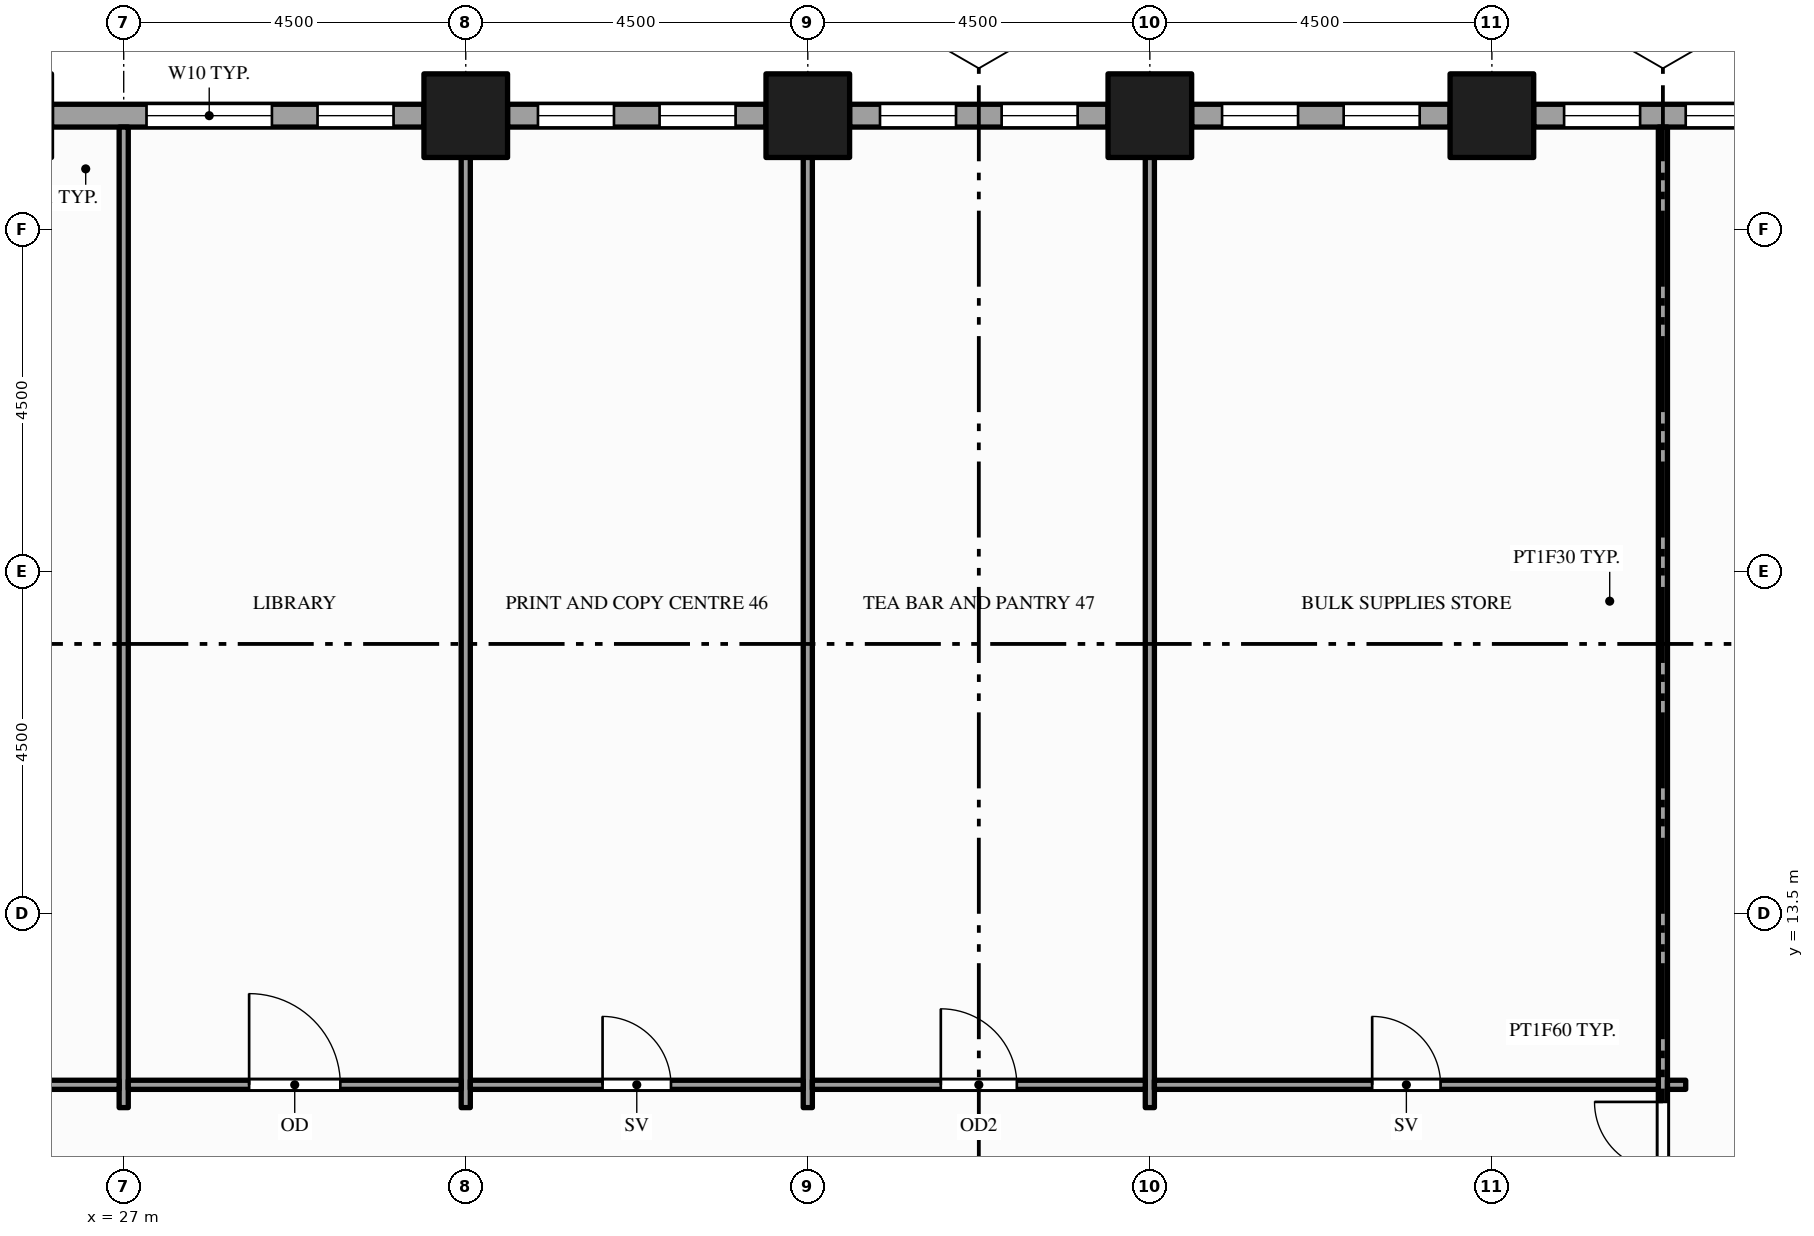
"""IFC4 building model, lengths in metres.
Left out: names, types, materials, properties, quantities, classifications, styles, units other than length and angle.
Written with IfcOpenShell. Run it as: python <this file> out.ifc"""

import sys

from ifc_helpers import new_model, si_unit, direction, frame, frame_2d, origin, origin_2d, place, context, subcontext, project, spatial, rectangle, hollow_rectangle, extrude, element, fill, save


model = new_model("IFC4")
c1 = context("Model", 3, precision=1e-05, world=origin(), true_north=direction((0.0, 1.0)))
c2 = subcontext(c1, "Body", "Model", "MODEL_VIEW")
j1 = project(units=[si_unit("LENGTHUNIT", "METRE"), si_unit("PLANEANGLEUNIT", "RADIAN")], contexts=[c1])
p1 = place(None, origin())
s1 = spatial("IfcSite", under=j1, at=p1, CompositionType="ELEMENT")
p2 = place(p1, origin())
s2 = spatial("IfcBuilding", under=s1, at=p2, CompositionType="ELEMENT")
p3 = place(p2, frame((0.0, 0.0, 73.0)))
s3 = spatial("IfcBuildingStorey", under=s2, at=p3, CompositionType="ELEMENT", Elevation=73.0)
for number, where, z_axis, x_axis in (
    (1, (31.5, 24.0, -0.15), (0.0, 0.0, 1.0), (1.0, 0.0, 0.0)),
    (2, (36.0, 24.0, -0.15), (0.0, 0.0, 1.0), (1.0, 0.0, 0.0)),
    (3, (40.5, 24.0, -0.15), (0.0, 0.0, 1.0), (1.0, 0.0, 0.0)),
    (4, (45.0, 24.0, -0.15), (0.0, 0.0, 1.0), (1.0, 0.0, 0.0)),
):
    element("IfcColumn", number, at=place(p3, frame(where, z_axis=z_axis, x_axis=x_axis)), inside=s3, PredefinedType="COLUMN", context=c2, shape_type="SweptSolid", body=[
        extrude(hollow_rectangle(XDim=1.1, YDim=1.1, WallThickness=0.06, at=origin_2d()), origin(), (0.0, 0.0, 1.0), 3.9),
    ])
p4 = place(p3, frame((48.95, 24.0, 0.0), z_axis=(0.0, 0.0, 1.0), x_axis=(-1.0, 0.0, 0.0)))
e5 = element("IfcWall", 5, at=p4, inside=s3, PredefinedType="STANDARD", context=c2, shape_type="SweptSolid", body=[
    extrude(rectangle(XDim=3.4, YDim=0.3, at=frame_2d((1.7, 0.0))), origin(), (0.0, 0.0, 1.0), 3.044),
])
p5 = place(p4, frame((0.4, 0.0, 0.9)))
e6 = element("IfcOpeningElement", 6, at=p5, cuts=e5, PredefinedType="OPENING", context=c2, shape_type="SweptSolid", body=[
    extrude(rectangle(XDim=1.0, YDim=2.0, at=frame_2d((0.5, 1.0))), frame((0.0, 0.16, 0.0), z_axis=(0.0, -1.0, 0.0), x_axis=(1.0, 0.0, 0.0)), (0.0, 0.0, 1.0), 0.32),
])
p6 = place(p4, frame((2.0, 0.0, 0.9)))
e7 = element("IfcOpeningElement", 7, at=p6, cuts=e5, PredefinedType="OPENING", context=c2, shape_type="SweptSolid", body=[
    extrude(rectangle(XDim=1.0, YDim=2.0, at=frame_2d((0.5, 1.0))), frame((0.0, 0.16, 0.0), z_axis=(0.0, -1.0, 0.0), x_axis=(1.0, 0.0, 0.0)), (0.0, 0.0, 1.0), 0.32),
])
p7 = place(p3, frame((44.45, 24.0, 0.0), z_axis=(0.0, 0.0, 1.0), x_axis=(-1.0, 0.0, 0.0)))
e8 = element("IfcWall", 8, at=p7, inside=s3, PredefinedType="STANDARD", context=c2, shape_type="SweptSolid", body=[
    extrude(rectangle(XDim=3.4, YDim=0.3, at=frame_2d((1.7, 0.0))), origin(), (0.0, 0.0, 1.0), 3.044),
])
p8 = place(p7, frame((0.4, 0.0, 0.9)))
e9 = element("IfcOpeningElement", 9, at=p8, cuts=e8, PredefinedType="OPENING", context=c2, shape_type="SweptSolid", body=[
    extrude(rectangle(XDim=1.0, YDim=2.0, at=frame_2d((0.5, 1.0))), frame((0.0, 0.16, 0.0), z_axis=(0.0, -1.0, 0.0), x_axis=(1.0, 0.0, 0.0)), (0.0, 0.0, 1.0), 0.32),
])
p9 = place(p7, frame((2.0, 0.0, 0.9)))
e10 = element("IfcOpeningElement", 10, at=p9, cuts=e8, PredefinedType="OPENING", context=c2, shape_type="SweptSolid", body=[
    extrude(rectangle(XDim=1.0, YDim=2.0, at=frame_2d((0.5, 1.0))), frame((0.0, 0.16, 0.0), z_axis=(0.0, -1.0, 0.0), x_axis=(1.0, 0.0, 0.0)), (0.0, 0.0, 1.0), 0.32),
])
p10 = place(p3, frame((39.95, 24.0, 0.0), z_axis=(0.0, 0.0, 1.0), x_axis=(-1.0, 0.0, 0.0)))
e11 = element("IfcWall", 11, at=p10, inside=s3, PredefinedType="STANDARD", context=c2, shape_type="SweptSolid", body=[
    extrude(rectangle(XDim=3.4, YDim=0.3, at=frame_2d((1.7, 0.0))), origin(), (0.0, 0.0, 1.0), 3.044),
])
p11 = place(p10, frame((0.4, 0.0, 0.9)))
e12 = element("IfcOpeningElement", 12, at=p11, cuts=e11, PredefinedType="OPENING", context=c2, shape_type="SweptSolid", body=[
    extrude(rectangle(XDim=1.0, YDim=2.0, at=frame_2d((0.5, 1.0))), frame((0.0, 0.16, 0.0), z_axis=(0.0, -1.0, 0.0), x_axis=(1.0, 0.0, 0.0)), (0.0, 0.0, 1.0), 0.32),
])
p12 = place(p10, frame((2.0, 0.0, 0.9)))
e13 = element("IfcOpeningElement", 13, at=p12, cuts=e11, PredefinedType="OPENING", context=c2, shape_type="SweptSolid", body=[
    extrude(rectangle(XDim=1.0, YDim=2.0, at=frame_2d((0.5, 1.0))), frame((0.0, 0.16, 0.0), z_axis=(0.0, -1.0, 0.0), x_axis=(1.0, 0.0, 0.0)), (0.0, 0.0, 1.0), 0.32),
])
p13 = place(p3, frame((35.45, 24.0, 0.0), z_axis=(0.0, 0.0, 1.0), x_axis=(-1.0, 0.0, 0.0)))
e14 = element("IfcWall", 14, at=p13, inside=s3, PredefinedType="STANDARD", context=c2, shape_type="SweptSolid", body=[
    extrude(rectangle(XDim=3.4, YDim=0.3, at=frame_2d((1.7, 0.0))), origin(), (0.0, 0.0, 1.0), 3.044),
])
p14 = place(p13, frame((0.4, 0.0, 0.9)))
e15 = element("IfcOpeningElement", 15, at=p14, cuts=e14, PredefinedType="OPENING", context=c2, shape_type="SweptSolid", body=[
    extrude(rectangle(XDim=1.0, YDim=2.0, at=frame_2d((0.5, 1.0))), frame((0.0, 0.16, 0.0), z_axis=(0.0, -1.0, 0.0), x_axis=(1.0, 0.0, 0.0)), (0.0, 0.0, 1.0), 0.32),
])
p15 = place(p13, frame((2.0, 0.0, 0.9)))
e16 = element("IfcOpeningElement", 16, at=p15, cuts=e14, PredefinedType="OPENING", context=c2, shape_type="SweptSolid", body=[
    extrude(rectangle(XDim=1.0, YDim=2.0, at=frame_2d((0.5, 1.0))), frame((0.0, 0.16, 0.0), z_axis=(0.0, -1.0, 0.0), x_axis=(1.0, 0.0, 0.0)), (0.0, 0.0, 1.0), 0.32),
])
p16 = place(p3, frame((30.95, 24.0, 0.0), z_axis=(0.0, 0.0, 1.0), x_axis=(-1.0, 0.0, 0.0)))
e17 = element("IfcWall", 17, at=p16, inside=s3, PredefinedType="STANDARD", context=c2, shape_type="SweptSolid", body=[
    extrude(rectangle(XDim=4.9, YDim=0.3, at=frame_2d((2.45, 0.0))), origin(), (0.0, 0.0, 1.0), 3.044),
])
p17 = place(p16, frame((0.4, 0.0, 0.9)))
e18 = element("IfcOpeningElement", 18, at=p17, cuts=e17, PredefinedType="OPENING", context=c2, shape_type="SweptSolid", body=[
    extrude(rectangle(XDim=1.0, YDim=2.0, at=frame_2d((0.5, 1.0))), frame((0.0, 0.16, 0.0), z_axis=(0.0, -1.0, 0.0), x_axis=(1.0, 0.0, 0.0)), (0.0, 0.0, 1.0), 0.32),
])
p18 = place(p16, frame((2.0, 0.0, 0.9)))
e19 = element("IfcOpeningElement", 19, at=p18, cuts=e17, PredefinedType="OPENING", context=c2, shape_type="SweptSolid", body=[
    extrude(rectangle(XDim=1.65, YDim=2.0, at=frame_2d((0.825, 1.0))), frame((0.0, 0.16, 0.0), z_axis=(0.0, -1.0, 0.0), x_axis=(1.0, 0.0, 0.0)), (0.0, 0.0, 1.0), 0.32),
])
for number, where, z_axis, x_axis in (
    (20, (27.0, 10.95, 0.0), (0.0, 0.0, 1.0), (0.0, 1.0, 0.0)),
    (21, (31.5, 10.95, 0.0), (0.0, 0.0, 1.0), (0.0, 1.0, 0.0)),
    (22, (36.0, 10.95, 0.0), (0.0, 0.0, 1.0), (0.0, 1.0, 0.0)),
    (23, (40.5, 10.95, 0.0), (0.0, 0.0, 1.0), (0.0, 1.0, 0.0)),
):
    element("IfcWall", number, at=place(p3, frame(where, z_axis=z_axis, x_axis=x_axis)), inside=s3, PredefinedType="PARTITIONING", context=c2, shape_type="SweptSolid", body=[
        extrude(rectangle(XDim=12.9, YDim=0.12, at=frame_2d((6.45, 0.0))), origin(), (0.0, 0.0, 1.0), 2.35),
    ])
p19 = place(p3, frame((47.25, 1.65, 0.0), z_axis=(0.0, 0.0, 1.0), x_axis=(0.0, 1.0, 0.0)))
e24 = element("IfcWall", 24, at=p19, inside=s3, PredefinedType="PARTITIONING", context=c2, shape_type="SweptSolid", body=[
    extrude(rectangle(XDim=22.2, YDim=0.12, at=frame_2d((11.1, 0.0))), origin(), (0.0, 0.0, 1.0), 2.838),
])
p20 = place(p19, frame((7.575, 0.0, 0.0)))
e25 = element("IfcOpeningElement", 25, at=p20, cuts=e24, PredefinedType="OPENING", context=c2, shape_type="SweptSolid", body=[
    extrude(rectangle(XDim=1.8, YDim=2.1, at=frame_2d((0.9, 1.05))), frame((0.0, 0.07, 0.0), z_axis=(0.0, -1.0, 0.0), x_axis=(1.0, 0.0, 0.0)), (0.0, 0.0, 1.0), 0.14),
])
p21 = place(p19, frame((0.85, 0.0, 0.0)))
e26 = element("IfcOpeningElement", 26, at=p21, cuts=e24, PredefinedType="OPENING", context=c2, shape_type="SweptSolid", body=[
    extrude(rectangle(XDim=0.9, YDim=2.1, at=frame_2d((0.45, 1.05))), frame((0.0, 0.07, 0.0), z_axis=(0.0, -1.0, 0.0), x_axis=(1.0, 0.0, 0.0)), (0.0, 0.0, 1.0), 0.14),
])
p22 = place(p19, frame((3.15, 0.0, 0.0)))
e27 = element("IfcOpeningElement", 27, at=p22, cuts=e24, PredefinedType="OPENING", context=c2, shape_type="SweptSolid", body=[
    extrude(rectangle(XDim=0.9, YDim=2.1, at=frame_2d((0.45, 1.05))), frame((0.0, 0.07, 0.0), z_axis=(0.0, -1.0, 0.0), x_axis=(1.0, 0.0, 0.0)), (0.0, 0.0, 1.0), 0.14),
])
p23 = place(p19, frame((5.35, 0.0, 0.0)))
e28 = element("IfcOpeningElement", 28, at=p23, cuts=e24, PredefinedType="OPENING", context=c2, shape_type="SweptSolid", body=[
    extrude(rectangle(XDim=1.0, YDim=2.1, at=frame_2d((0.5, 1.05))), frame((0.0, 0.07, 0.0), z_axis=(0.0, -1.0, 0.0), x_axis=(1.0, 0.0, 0.0)), (0.0, 0.0, 1.0), 0.14),
])
p24 = place(p3, frame((11.31, 11.25, 0.0), z_axis=(0.0, 0.0, 1.0), x_axis=(1.0, 0.0, 0.0)))
e29 = element("IfcWall", 29, at=p24, inside=s3, PredefinedType="PARTITIONING", context=c2, shape_type="SweptSolid", body=[
    extrude(rectangle(XDim=15.63, YDim=0.12, at=frame_2d((7.815, 0.0))), origin(), (0.0, 0.0, 1.0), 2.838),
])
p25 = place(p24, frame((3.54, 0.0, 0.0)))
e30 = element("IfcOpeningElement", 30, at=p25, cuts=e29, PredefinedType="OPENING", context=c2, shape_type="SweptSolid", body=[
    extrude(rectangle(XDim=1.8, YDim=2.1, at=frame_2d((0.9, 1.05))), frame((0.0, 0.07, 0.0), z_axis=(0.0, -1.0, 0.0), x_axis=(1.0, 0.0, 0.0)), (0.0, 0.0, 1.0), 0.14),
])
p26 = place(p3, frame((27.06, 11.25, 0.0), z_axis=(0.0, 0.0, 1.0), x_axis=(1.0, 0.0, 0.0)))
e31 = element("IfcWall", 31, at=p26, inside=s3, PredefinedType="PARTITIONING", context=c2, shape_type="SweptSolid", body=[
    extrude(rectangle(XDim=4.38, YDim=0.12, at=frame_2d((2.19, 0.0))), origin(), (0.0, 0.0, 1.0), 2.838),
])
p27 = place(p26, frame((1.59, 0.0, 0.0)))
e32 = element("IfcOpeningElement", 32, at=p27, cuts=e31, PredefinedType="OPENING", context=c2, shape_type="SweptSolid", body=[
    extrude(rectangle(XDim=1.2, YDim=2.1, at=frame_2d((0.6, 1.05))), frame((0.0, 0.07, 0.0), z_axis=(0.0, -1.0, 0.0), x_axis=(1.0, 0.0, 0.0)), (0.0, 0.0, 1.0), 0.14),
])
p28 = place(p3, frame((31.56, 11.25, 0.0), z_axis=(0.0, 0.0, 1.0), x_axis=(1.0, 0.0, 0.0)))
e33 = element("IfcWall", 33, at=p28, inside=s3, PredefinedType="PARTITIONING", context=c2, shape_type="SweptSolid", body=[
    extrude(rectangle(XDim=4.38, YDim=0.12, at=frame_2d((2.19, 0.0))), origin(), (0.0, 0.0, 1.0), 2.838),
])
p29 = place(p28, frame((1.74, 0.0, 0.0)))
e34 = element("IfcOpeningElement", 34, at=p29, cuts=e33, PredefinedType="OPENING", context=c2, shape_type="SweptSolid", body=[
    extrude(rectangle(XDim=0.9, YDim=2.1, at=frame_2d((0.45, 1.05))), frame((0.0, 0.07, 0.0), z_axis=(0.0, -1.0, 0.0), x_axis=(1.0, 0.0, 0.0)), (0.0, 0.0, 1.0), 0.14),
])
p30 = place(p3, frame((36.06, 11.25, 0.0), z_axis=(0.0, 0.0, 1.0), x_axis=(1.0, 0.0, 0.0)))
e35 = element("IfcWall", 35, at=p30, inside=s3, PredefinedType="PARTITIONING", context=c2, shape_type="SweptSolid", body=[
    extrude(rectangle(XDim=4.38, YDim=0.12, at=frame_2d((2.19, 0.0))), origin(), (0.0, 0.0, 1.0), 2.838),
])
p31 = place(p30, frame((1.69, 0.0, 0.0)))
e36 = element("IfcOpeningElement", 36, at=p31, cuts=e35, PredefinedType="OPENING", context=c2, shape_type="SweptSolid", body=[
    extrude(rectangle(XDim=1.0, YDim=2.1, at=frame_2d((0.5, 1.05))), frame((0.0, 0.07, 0.0), z_axis=(0.0, -1.0, 0.0), x_axis=(1.0, 0.0, 0.0)), (0.0, 0.0, 1.0), 0.14),
])
p32 = place(p3, frame((40.56, 11.25, 0.0), z_axis=(0.0, 0.0, 1.0), x_axis=(1.0, 0.0, 0.0)))
e37 = element("IfcWall", 37, at=p32, inside=s3, PredefinedType="PARTITIONING", context=c2, shape_type="SweptSolid", body=[
    extrude(rectangle(XDim=6.63, YDim=0.12, at=frame_2d((3.315, 0.0))), origin(), (0.0, 0.0, 1.0), 2.838),
])
p33 = place(p32, frame((2.865, 0.0, 0.0)))
e38 = element("IfcOpeningElement", 38, at=p33, cuts=e37, PredefinedType="OPENING", context=c2, shape_type="SweptSolid", body=[
    extrude(rectangle(XDim=0.9, YDim=2.1, at=frame_2d((0.45, 1.05))), frame((0.0, 0.07, 0.0), z_axis=(0.0, -1.0, 0.0), x_axis=(1.0, 0.0, 0.0)), (0.0, 0.0, 1.0), 0.14),
])
p34 = place(p3, frame((47.31, 11.25, 0.0), z_axis=(0.0, 0.0, 1.0), x_axis=(1.0, 0.0, 0.0)))
e39 = element("IfcWall", 39, at=p34, inside=s3, PredefinedType="PARTITIONING", context=c2, shape_type="SweptSolid", body=[
    extrude(rectangle(XDim=0.24, YDim=0.12, at=frame_2d((0.12, 0.0))), origin(), (0.0, 0.0, 1.0), 2.838),
])
p35 = place(p5, origin())
e40 = element("IfcWindow", 40, at=p35, inside=s3, PartitioningType="SINGLE_PANEL", PredefinedType="WINDOW", context=c2, shape_type="SweptSolid", body=[
    extrude(rectangle(XDim=1.0, YDim=2.0, at=frame_2d((0.5, 1.0))), frame((0.0, 0.03, 0.0), z_axis=(0.0, -1.0, 0.0), x_axis=(1.0, 0.0, 0.0)), (0.0, 0.0, 1.0), 0.06),
])
fill(e6, e40)
p36 = place(p6, origin())
e41 = element("IfcWindow", 41, at=p36, inside=s3, PartitioningType="SINGLE_PANEL", PredefinedType="WINDOW", context=c2, shape_type="SweptSolid", body=[
    extrude(rectangle(XDim=1.0, YDim=2.0, at=frame_2d((0.5, 1.0))), frame((0.0, 0.03, 0.0), z_axis=(0.0, -1.0, 0.0), x_axis=(1.0, 0.0, 0.0)), (0.0, 0.0, 1.0), 0.06),
])
fill(e7, e41)
p37 = place(p8, origin())
e42 = element("IfcWindow", 42, at=p37, inside=s3, PartitioningType="SINGLE_PANEL", PredefinedType="WINDOW", context=c2, shape_type="SweptSolid", body=[
    extrude(rectangle(XDim=1.0, YDim=2.0, at=frame_2d((0.5, 1.0))), frame((0.0, 0.03, 0.0), z_axis=(0.0, -1.0, 0.0), x_axis=(1.0, 0.0, 0.0)), (0.0, 0.0, 1.0), 0.06),
])
fill(e9, e42)
p38 = place(p9, origin())
e43 = element("IfcWindow", 43, at=p38, inside=s3, PartitioningType="SINGLE_PANEL", PredefinedType="WINDOW", context=c2, shape_type="SweptSolid", body=[
    extrude(rectangle(XDim=1.0, YDim=2.0, at=frame_2d((0.5, 1.0))), frame((0.0, 0.03, 0.0), z_axis=(0.0, -1.0, 0.0), x_axis=(1.0, 0.0, 0.0)), (0.0, 0.0, 1.0), 0.06),
])
fill(e10, e43)
p39 = place(p11, origin())
e44 = element("IfcWindow", 44, at=p39, inside=s3, PartitioningType="SINGLE_PANEL", PredefinedType="WINDOW", context=c2, shape_type="SweptSolid", body=[
    extrude(rectangle(XDim=1.0, YDim=2.0, at=frame_2d((0.5, 1.0))), frame((0.0, 0.03, 0.0), z_axis=(0.0, -1.0, 0.0), x_axis=(1.0, 0.0, 0.0)), (0.0, 0.0, 1.0), 0.06),
])
fill(e12, e44)
p40 = place(p12, origin())
e45 = element("IfcWindow", 45, at=p40, inside=s3, PartitioningType="SINGLE_PANEL", PredefinedType="WINDOW", context=c2, shape_type="SweptSolid", body=[
    extrude(rectangle(XDim=1.0, YDim=2.0, at=frame_2d((0.5, 1.0))), frame((0.0, 0.03, 0.0), z_axis=(0.0, -1.0, 0.0), x_axis=(1.0, 0.0, 0.0)), (0.0, 0.0, 1.0), 0.06),
])
fill(e13, e45)
p41 = place(p14, origin())
e46 = element("IfcWindow", 46, at=p41, inside=s3, PartitioningType="SINGLE_PANEL", PredefinedType="WINDOW", context=c2, shape_type="SweptSolid", body=[
    extrude(rectangle(XDim=1.0, YDim=2.0, at=frame_2d((0.5, 1.0))), frame((0.0, 0.03, 0.0), z_axis=(0.0, -1.0, 0.0), x_axis=(1.0, 0.0, 0.0)), (0.0, 0.0, 1.0), 0.06),
])
fill(e15, e46)
p42 = place(p15, origin())
e47 = element("IfcWindow", 47, at=p42, inside=s3, PartitioningType="SINGLE_PANEL", PredefinedType="WINDOW", context=c2, shape_type="SweptSolid", body=[
    extrude(rectangle(XDim=1.0, YDim=2.0, at=frame_2d((0.5, 1.0))), frame((0.0, 0.03, 0.0), z_axis=(0.0, -1.0, 0.0), x_axis=(1.0, 0.0, 0.0)), (0.0, 0.0, 1.0), 0.06),
])
fill(e16, e47)
p43 = place(p17, origin())
e48 = element("IfcWindow", 48, at=p43, inside=s3, PartitioningType="SINGLE_PANEL", PredefinedType="WINDOW", context=c2, shape_type="SweptSolid", body=[
    extrude(rectangle(XDim=1.0, YDim=2.0, at=frame_2d((0.5, 1.0))), frame((0.0, 0.03, 0.0), z_axis=(0.0, -1.0, 0.0), x_axis=(1.0, 0.0, 0.0)), (0.0, 0.0, 1.0), 0.06),
])
fill(e18, e48)
p44 = place(p18, origin())
e49 = element("IfcWindow", 49, at=p44, inside=s3, PartitioningType="SINGLE_PANEL", PredefinedType="WINDOW", context=c2, shape_type="SweptSolid", body=[
    extrude(rectangle(XDim=1.65, YDim=2.0, at=frame_2d((0.825, 1.0))), frame((0.0, 0.03, 0.0), z_axis=(0.0, -1.0, 0.0), x_axis=(1.0, 0.0, 0.0)), (0.0, 0.0, 1.0), 0.06),
])
fill(e19, e49)
p45 = place(p20, origin())
e50 = element("IfcDoor", 50, at=p45, inside=s3, OperationType="DOUBLE_DOOR_SINGLE_SWING", PredefinedType="DOOR", context=c2, shape_type="SweptSolid", body=[
    extrude(rectangle(XDim=1.8, YDim=2.1, at=frame_2d((0.9, 1.05))), frame((0.0, 0.025, 0.0), z_axis=(0.0, -1.0, 0.0), x_axis=(1.0, 0.0, 0.0)), (0.0, 0.0, 1.0), 0.05),
])
fill(e25, e50)
p46 = place(p27, origin())
e51 = element("IfcDoor", 51, at=p46, inside=s3, OperationType="SINGLE_SWING_LEFT", PredefinedType="DOOR", context=c2, shape_type="SweptSolid", body=[
    extrude(rectangle(XDim=1.2, YDim=2.1, at=frame_2d((0.6, 1.05))), frame((0.0, 0.025, 0.0), z_axis=(0.0, -1.0, 0.0), x_axis=(1.0, 0.0, 0.0)), (0.0, 0.0, 1.0), 0.05),
])
fill(e32, e51)
p47 = place(p29, origin())
e52 = element("IfcDoor", 52, at=p47, inside=s3, OperationType="SINGLE_SWING_LEFT", PredefinedType="DOOR", context=c2, shape_type="SweptSolid", body=[
    extrude(rectangle(XDim=0.9, YDim=2.1, at=frame_2d((0.45, 1.05))), frame((0.0, 0.025, 0.0), z_axis=(0.0, -1.0, 0.0), x_axis=(1.0, 0.0, 0.0)), (0.0, 0.0, 1.0), 0.05),
])
fill(e34, e52)
p48 = place(p31, origin())
e53 = element("IfcDoor", 53, at=p48, inside=s3, OperationType="SINGLE_SWING_LEFT", PredefinedType="DOOR", context=c2, shape_type="SweptSolid", body=[
    extrude(rectangle(XDim=1.0, YDim=2.1, at=frame_2d((0.5, 1.05))), frame((0.0, 0.025, 0.0), z_axis=(0.0, -1.0, 0.0), x_axis=(1.0, 0.0, 0.0)), (0.0, 0.0, 1.0), 0.05),
])
fill(e36, e53)
p49 = place(p33, origin())
e54 = element("IfcDoor", 54, at=p49, inside=s3, OperationType="SINGLE_SWING_LEFT", PredefinedType="DOOR", context=c2, shape_type="SweptSolid", body=[
    extrude(rectangle(XDim=0.9, YDim=2.1, at=frame_2d((0.45, 1.05))), frame((0.0, 0.025, 0.0), z_axis=(0.0, -1.0, 0.0), x_axis=(1.0, 0.0, 0.0)), (0.0, 0.0, 1.0), 0.05),
])
fill(e38, e54)
save(model, sys.argv[1])
